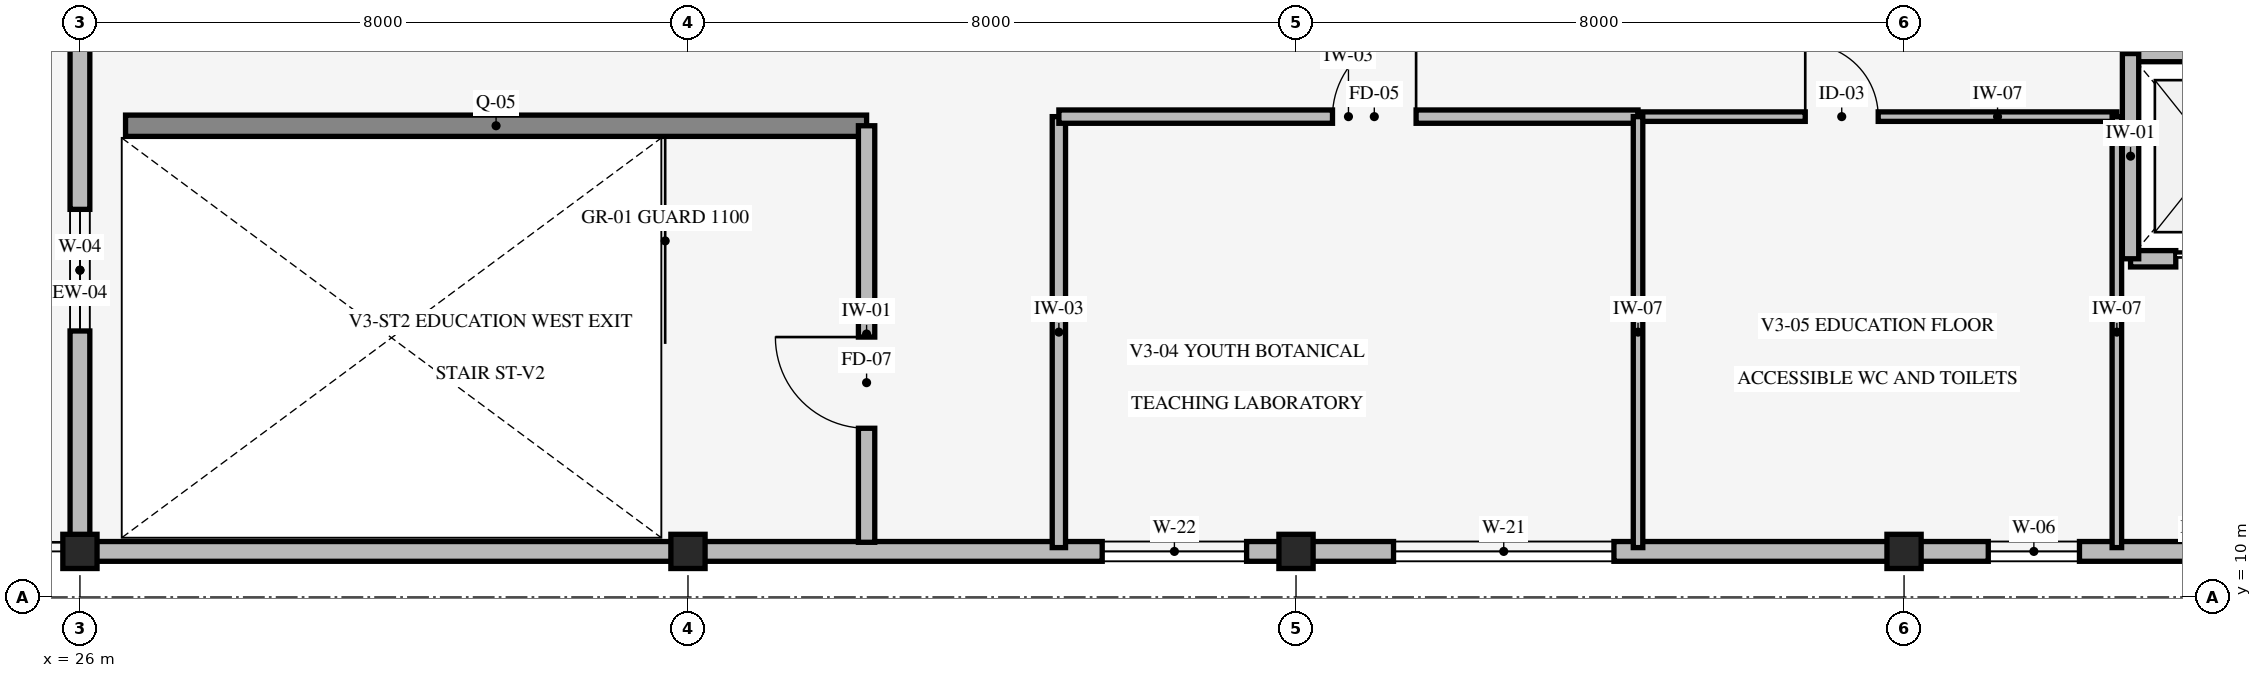
"""IFC4 building model, lengths in metres.
Left out: names, types, materials, properties, quantities, classifications, styles, units other than length and angle.
Written with IfcOpenShell. Run it as: python <this file> out.ifc"""

import sys

from ifc_helpers import new_model, si_unit, direction, frame, frame_2d, origin, origin_2d, place, context, subcontext, project, spatial, rectangle, extrude, element, fill, save


model = new_model("IFC4")
c1 = context("Model", 3, precision=1e-05, world=origin(), true_north=direction((0.0, 1.0)))
c2 = subcontext(c1, "Body", "Model", "MODEL_VIEW")
j1 = project(units=[si_unit("LENGTHUNIT", "METRE"), si_unit("PLANEANGLEUNIT", "RADIAN")], contexts=[c1])
p1 = place(None, origin())
s1 = spatial("IfcSite", under=j1, at=p1, CompositionType="ELEMENT")
p2 = place(p1, origin())
s2 = spatial("IfcBuilding", under=s1, at=p2, CompositionType="ELEMENT")
p3 = place(p2, frame((0.0, 0.0, 10.2)))
s3 = spatial("IfcBuildingStorey", under=s2, at=p3, CompositionType="ELEMENT", Elevation=10.2)
for number, where, z_axis, x_axis in (
    (1, (26.0, 10.6, 0.0), (0.0, 0.0, 1.0), (1.0, 0.0, 0.0)),
    (2, (34.0, 10.6, 0.0), (0.0, 0.0, 1.0), (1.0, 0.0, 0.0)),
    (3, (42.0, 10.6, 0.0), (0.0, 0.0, 1.0), (1.0, 0.0, 0.0)),
    (4, (50.0, 10.6, 0.0), (0.0, 0.0, 1.0), (1.0, 0.0, 0.0)),
):
    element("IfcColumn", number, at=place(p3, frame(where, z_axis=z_axis, x_axis=x_axis)), inside=s3, PredefinedType="COLUMN", context=c2, shape_type="SweptSolid", body=[
        extrude(rectangle(XDim=0.45, YDim=0.45, at=origin_2d()), origin(), (0.0, 0.0, 1.0), 4.8),
    ])
p4 = place(p3, frame((58.0, 10.6, 0.0), z_axis=(0.0, 0.0, 1.0), x_axis=(-1.0, 0.0, 0.0)))
e5 = element("IfcWall", 5, at=p4, inside=s3, PredefinedType="STANDARD", context=c2, shape_type="SweptSolid", body=[
    extrude(rectangle(XDim=8.0, YDim=0.26, at=frame_2d((4.0, 0.0))), origin(), (0.0, 0.0, 1.0), 4.01),
])
p5 = place(p4, frame((5.692, 0.0, 0.85)))
e6 = element("IfcOpeningElement", 6, at=p5, cuts=e5, PredefinedType="OPENING", context=c2, shape_type="SweptSolid", body=[
    extrude(rectangle(XDim=1.2, YDim=1.2, at=frame_2d((0.6, 0.6))), frame((0.0, 0.14, 0.0), z_axis=(0.0, -1.0, 0.0), x_axis=(1.0, 0.0, 0.0)), (0.0, 0.0, 1.0), 0.28),
])
p6 = place(p3, frame((50.0, 10.6, 0.0), z_axis=(0.0, 0.0, 1.0), x_axis=(-1.0, 0.0, 0.0)))
e7 = element("IfcWall", 7, at=p6, inside=s3, PredefinedType="STANDARD", context=c2, shape_type="SweptSolid", body=[
    extrude(rectangle(XDim=8.0, YDim=0.26, at=frame_2d((4.0, 0.0))), origin(), (0.0, 0.0, 1.0), 4.01),
])
p7 = place(p6, frame((3.817, 0.0, 0.85)))
e8 = element("IfcOpeningElement", 8, at=p7, cuts=e7, PredefinedType="OPENING", context=c2, shape_type="SweptSolid", body=[
    extrude(rectangle(XDim=2.9, YDim=1.7, at=frame_2d((1.45, 0.85))), frame((0.0, 0.14, 0.0), z_axis=(0.0, -1.0, 0.0), x_axis=(1.0, 0.0, 0.0)), (0.0, 0.0, 1.0), 0.28),
])
p8 = place(p3, frame((42.0, 10.6, 0.0), z_axis=(0.0, 0.0, 1.0), x_axis=(-1.0, 0.0, 0.0)))
e9 = element("IfcWall", 9, at=p8, inside=s3, PredefinedType="STANDARD", context=c2, shape_type="SweptSolid", body=[
    extrude(rectangle(XDim=8.0, YDim=0.26, at=frame_2d((4.0, 0.0))), origin(), (0.0, 0.0, 1.0), 4.01),
])
p9 = place(p8, frame((0.65, 0.0, 0.85)))
e10 = element("IfcOpeningElement", 10, at=p9, cuts=e9, PredefinedType="OPENING", context=c2, shape_type="SweptSolid", body=[
    extrude(rectangle(XDim=1.9, YDim=1.3, at=frame_2d((0.95, 0.65))), frame((0.0, 0.14, 0.0), z_axis=(0.0, -1.0, 0.0), x_axis=(1.0, 0.0, 0.0)), (0.0, 0.0, 1.0), 0.28),
])
p10 = place(p3, frame((34.0, 10.6, 0.0), z_axis=(0.0, 0.0, 1.0), x_axis=(-1.0, 0.0, 0.0)))
e11 = element("IfcWall", 11, at=p10, inside=s3, PredefinedType="STANDARD", context=c2, shape_type="SweptSolid", body=[
    extrude(rectangle(XDim=8.0, YDim=0.26, at=frame_2d((4.0, 0.0))), origin(), (0.0, 0.0, 1.0), 4.01),
])
p11 = place(p3, frame((26.0, 10.6, 0.0), z_axis=(0.0, 0.0, 1.0), x_axis=(0.0, 1.0, 0.0)))
e12 = element("IfcWall", 12, at=p11, inside=s3, PredefinedType="STANDARD", context=c2, shape_type="SweptSolid", body=[
    extrude(rectangle(XDim=7.4, YDim=0.26, at=frame_2d((3.7, 0.0))), origin(), (0.0, 0.0, 1.0), 4.01),
])
p12 = place(p11, frame((2.9, 0.0, 0.85)))
e13 = element("IfcOpeningElement", 13, at=p12, cuts=e12, PredefinedType="OPENING", context=c2, shape_type="SweptSolid", body=[
    extrude(rectangle(XDim=1.6, YDim=1.2, at=frame_2d((0.8, 0.6))), frame((0.0, 0.14, 0.0), z_axis=(0.0, -1.0, 0.0), x_axis=(1.0, 0.0, 0.0)), (0.0, 0.0, 1.0), 0.28),
])
p13 = place(p3, frame((26.6, 16.2, 0.0), z_axis=(0.0, 0.0, 1.0), x_axis=(1.0, 0.0, 0.0)))
e14 = element("IfcWall", 14, at=p13, inside=s3, PredefinedType="SHEAR", context=c2, shape_type="SweptSolid", body=[
    extrude(rectangle(XDim=9.75, YDim=0.28, at=frame_2d((4.875, 0.0))), origin(), (0.0, 0.0, 1.0), 4.4),
])
p14 = place(p3, frame((36.35, 10.72, 0.0), z_axis=(0.0, 0.0, 1.0), x_axis=(0.0, 1.0, 0.0)))
e15 = element("IfcWall", 15, at=p14, inside=s3, PredefinedType="STANDARD", context=c2, shape_type="SweptSolid", body=[
    extrude(rectangle(XDim=5.48, YDim=0.215, at=frame_2d((2.74, 0.0))), origin(), (0.0, 0.0, 1.0), 4.5),
])
p15 = place(p14, frame((1.5, 0.0, 0.0)))
e16 = element("IfcOpeningElement", 16, at=p15, cuts=e15, PredefinedType="OPENING", context=c2, shape_type="SweptSolid", body=[
    extrude(rectangle(XDim=1.2, YDim=2.1, at=frame_2d((0.6, 1.05))), frame((0.0, 0.118, 0.0), z_axis=(0.0, -1.0, 0.0), x_axis=(1.0, 0.0, 0.0)), (0.0, 0.0, 1.0), 0.235),
])
p16 = place(p3, frame((52.98, 14.45, 0.0), z_axis=(0.0, 0.0, 1.0), x_axis=(1.0, 0.0, 0.0)))
e17 = element("IfcWall", 17, at=p16, inside=s3, PredefinedType="STANDARD", context=c2, shape_type="SweptSolid", body=[
    extrude(rectangle(XDim=2.24, YDim=0.215, at=frame_2d((1.12, 0.0))), origin(), (0.0, 0.0, 1.0), 4.5),
])
p17 = place(p16, frame((0.595, 0.0, 0.0)))
e18 = element("IfcOpeningElement", 18, at=p17, cuts=e17, PredefinedType="OPENING", context=c2, shape_type="SweptSolid", body=[
    extrude(rectangle(XDim=1.05, YDim=2.2, at=frame_2d((0.525, 1.1))), frame((0.0, 0.118, 0.0), z_axis=(0.0, -1.0, 0.0), x_axis=(1.0, 0.0, 0.0)), (0.0, 0.0, 1.0), 0.235),
])
p18 = place(p3, frame((55.22, 17.15, 0.0), z_axis=(0.0, 0.0, 1.0), x_axis=(-1.0, 0.0, 0.0)))
e19 = element("IfcWall", 19, at=p18, inside=s3, PredefinedType="STANDARD", context=c2, shape_type="SweptSolid", body=[
    extrude(rectangle(XDim=2.24, YDim=0.215, at=frame_2d((1.12, 0.0))), origin(), (0.0, 0.0, 1.0), 4.5),
])
p19 = place(p3, frame((52.98, 17.15, 0.0), z_axis=(0.0, 0.0, 1.0), x_axis=(0.0, -1.0, 0.0)))
e20 = element("IfcWall", 20, at=p19, inside=s3, PredefinedType="STANDARD", context=c2, shape_type="SweptSolid", body=[
    extrude(rectangle(XDim=2.7, YDim=0.215, at=frame_2d((1.35, 0.0))), origin(), (0.0, 0.0, 1.0), 4.5),
])
p20 = place(p3, frame((38.88, 10.65, 0.0), z_axis=(0.0, 0.0, 1.0), x_axis=(0.0, 1.0, 0.0)))
e21 = element("IfcWall", 21, at=p20, inside=s3, PredefinedType="STANDARD", context=c2, shape_type="SweptSolid", body=[
    extrude(rectangle(XDim=5.67, YDim=0.175, at=frame_2d((2.835, 0.0))), origin(), (0.0, 0.0, 1.0), 4.5),
])
p21 = place(p3, frame((38.88, 16.32, 0.0), z_axis=(0.0, 0.0, 1.0), x_axis=(1.0, 0.0, 0.0)))
e22 = element("IfcWall", 22, at=p21, inside=s3, PredefinedType="STANDARD", context=c2, shape_type="SweptSolid", body=[
    extrude(rectangle(XDim=7.62, YDim=0.175, at=frame_2d((3.81, 0.0))), origin(), (0.0, 0.0, 1.0), 4.5),
])
p22 = place(p21, frame((3.6, 0.0, 0.0)))
e23 = element("IfcOpeningElement", 23, at=p22, cuts=e22, PredefinedType="OPENING", context=c2, shape_type="SweptSolid", body=[
    extrude(rectangle(XDim=1.1, YDim=2.1, at=frame_2d((0.55, 1.05))), frame((0.0, 0.098, 0.0), z_axis=(0.0, -1.0, 0.0), x_axis=(1.0, 0.0, 0.0)), (0.0, 0.0, 1.0), 0.195),
])
p23 = place(p3, frame((46.5, 16.32, 0.0), z_axis=(0.0, 0.0, 1.0), x_axis=(1.0, 0.0, 0.0)))
e24 = element("IfcWall", 24, at=p23, inside=s3, PredefinedType="STANDARD", context=c2, shape_type="SweptSolid", body=[
    extrude(rectangle(XDim=6.3, YDim=0.125, at=frame_2d((3.15, 0.0))), origin(), (0.0, 0.0, 1.0), 4.5),
])
p24 = place(p23, frame((2.2, 0.0, 0.0)))
e25 = element("IfcOpeningElement", 25, at=p24, cuts=e24, PredefinedType="OPENING", context=c2, shape_type="SweptSolid", body=[
    extrude(rectangle(XDim=0.96, YDim=2.08, at=frame_2d((0.48, 1.04))), frame((0.0, 0.073, 0.0), z_axis=(0.0, -1.0, 0.0), x_axis=(1.0, 0.0, 0.0)), (0.0, 0.0, 1.0), 0.145),
])
for number, where, z_axis, x_axis in (
    (26, (46.5, 10.65, 0.0), (0.0, 0.0, 1.0), (0.0, 1.0, 0.0)),
    (27, (52.8, 10.65, 0.0), (0.0, 0.0, 1.0), (0.0, 1.0, 0.0)),
):
    element("IfcWall", number, at=place(p3, frame(where, z_axis=z_axis, x_axis=x_axis)), inside=s3, PredefinedType="STANDARD", context=c2, shape_type="SweptSolid", body=[
        extrude(rectangle(XDim=5.67, YDim=0.125, at=frame_2d((2.835, 0.0))), origin(), (0.0, 0.0, 1.0), 4.5),
    ])
p25 = place(p5, origin())
e28 = element("IfcWindow", 28, at=p25, inside=s3, PartitioningType="SINGLE_PANEL", PredefinedType="WINDOW", context=c2, shape_type="SweptSolid", body=[
    extrude(rectangle(XDim=1.2, YDim=1.2, at=frame_2d((0.6, 0.6))), frame((0.0, 0.03, 0.0), z_axis=(0.0, -1.0, 0.0), x_axis=(1.0, 0.0, 0.0)), (0.0, 0.0, 1.0), 0.06),
])
fill(e6, e28)
p26 = place(p7, origin())
e29 = element("IfcWindow", 29, at=p26, inside=s3, PartitioningType="SINGLE_PANEL", PredefinedType="WINDOW", context=c2, shape_type="SweptSolid", body=[
    extrude(rectangle(XDim=2.9, YDim=1.7, at=frame_2d((1.45, 0.85))), frame((0.0, 0.03, 0.0), z_axis=(0.0, -1.0, 0.0), x_axis=(1.0, 0.0, 0.0)), (0.0, 0.0, 1.0), 0.06),
])
fill(e8, e29)
p27 = place(p9, origin())
e30 = element("IfcWindow", 30, at=p27, inside=s3, PartitioningType="SINGLE_PANEL", PredefinedType="WINDOW", context=c2, shape_type="SweptSolid", body=[
    extrude(rectangle(XDim=1.9, YDim=1.3, at=frame_2d((0.95, 0.65))), frame((0.0, 0.03, 0.0), z_axis=(0.0, -1.0, 0.0), x_axis=(1.0, 0.0, 0.0)), (0.0, 0.0, 1.0), 0.06),
])
fill(e10, e30)
p28 = place(p12, origin())
e31 = element("IfcWindow", 31, at=p28, inside=s3, PartitioningType="SINGLE_PANEL", PredefinedType="WINDOW", context=c2, shape_type="SweptSolid", body=[
    extrude(rectangle(XDim=1.6, YDim=1.2, at=frame_2d((0.8, 0.6))), frame((0.0, 0.03, 0.0), z_axis=(0.0, -1.0, 0.0), x_axis=(1.0, 0.0, 0.0)), (0.0, 0.0, 1.0), 0.06),
])
fill(e13, e31)
p29 = place(p15, origin())
e32 = element("IfcDoor", 32, at=p29, inside=s3, OperationType="SINGLE_SWING_RIGHT", PredefinedType="DOOR", context=c2, shape_type="SweptSolid", body=[
    extrude(rectangle(XDim=1.2, YDim=2.1, at=frame_2d((0.6, 1.05))), frame((0.0, 0.025, 0.0), z_axis=(0.0, -1.0, 0.0), x_axis=(1.0, 0.0, 0.0)), (0.0, 0.0, 1.0), 0.05),
])
fill(e16, e32)
p30 = place(p17, origin())
e33 = element("IfcDoor", 33, at=p30, inside=s3, OperationType="SLIDING_TO_RIGHT", PredefinedType="DOOR", context=c2, shape_type="SweptSolid", body=[
    extrude(rectangle(XDim=1.05, YDim=2.2, at=frame_2d((0.525, 1.1))), frame((0.0, 0.025, 0.0), z_axis=(0.0, -1.0, 0.0), x_axis=(1.0, 0.0, 0.0)), (0.0, 0.0, 1.0), 0.05),
])
fill(e18, e33)
p31 = place(p22, origin())
e34 = element("IfcDoor", 34, at=p31, inside=s3, OperationType="SINGLE_SWING_RIGHT", PredefinedType="DOOR", context=c2, shape_type="SweptSolid", body=[
    extrude(rectangle(XDim=1.1, YDim=2.1, at=frame_2d((0.55, 1.05))), frame((0.0, 0.025, 0.0), z_axis=(0.0, -1.0, 0.0), x_axis=(1.0, 0.0, 0.0)), (0.0, 0.0, 1.0), 0.05),
])
fill(e23, e34)
p32 = place(p24, origin())
e35 = element("IfcDoor", 35, at=p32, inside=s3, OperationType="SINGLE_SWING_LEFT", PredefinedType="DOOR", context=c2, shape_type="SweptSolid", body=[
    extrude(rectangle(XDim=0.96, YDim=2.08, at=frame_2d((0.48, 1.04))), frame((0.0, 0.025, 0.0), z_axis=(0.0, -1.0, 0.0), x_axis=(1.0, 0.0, 0.0)), (0.0, 0.0, 1.0), 0.05),
])
fill(e25, e35)
save(model, sys.argv[1])
